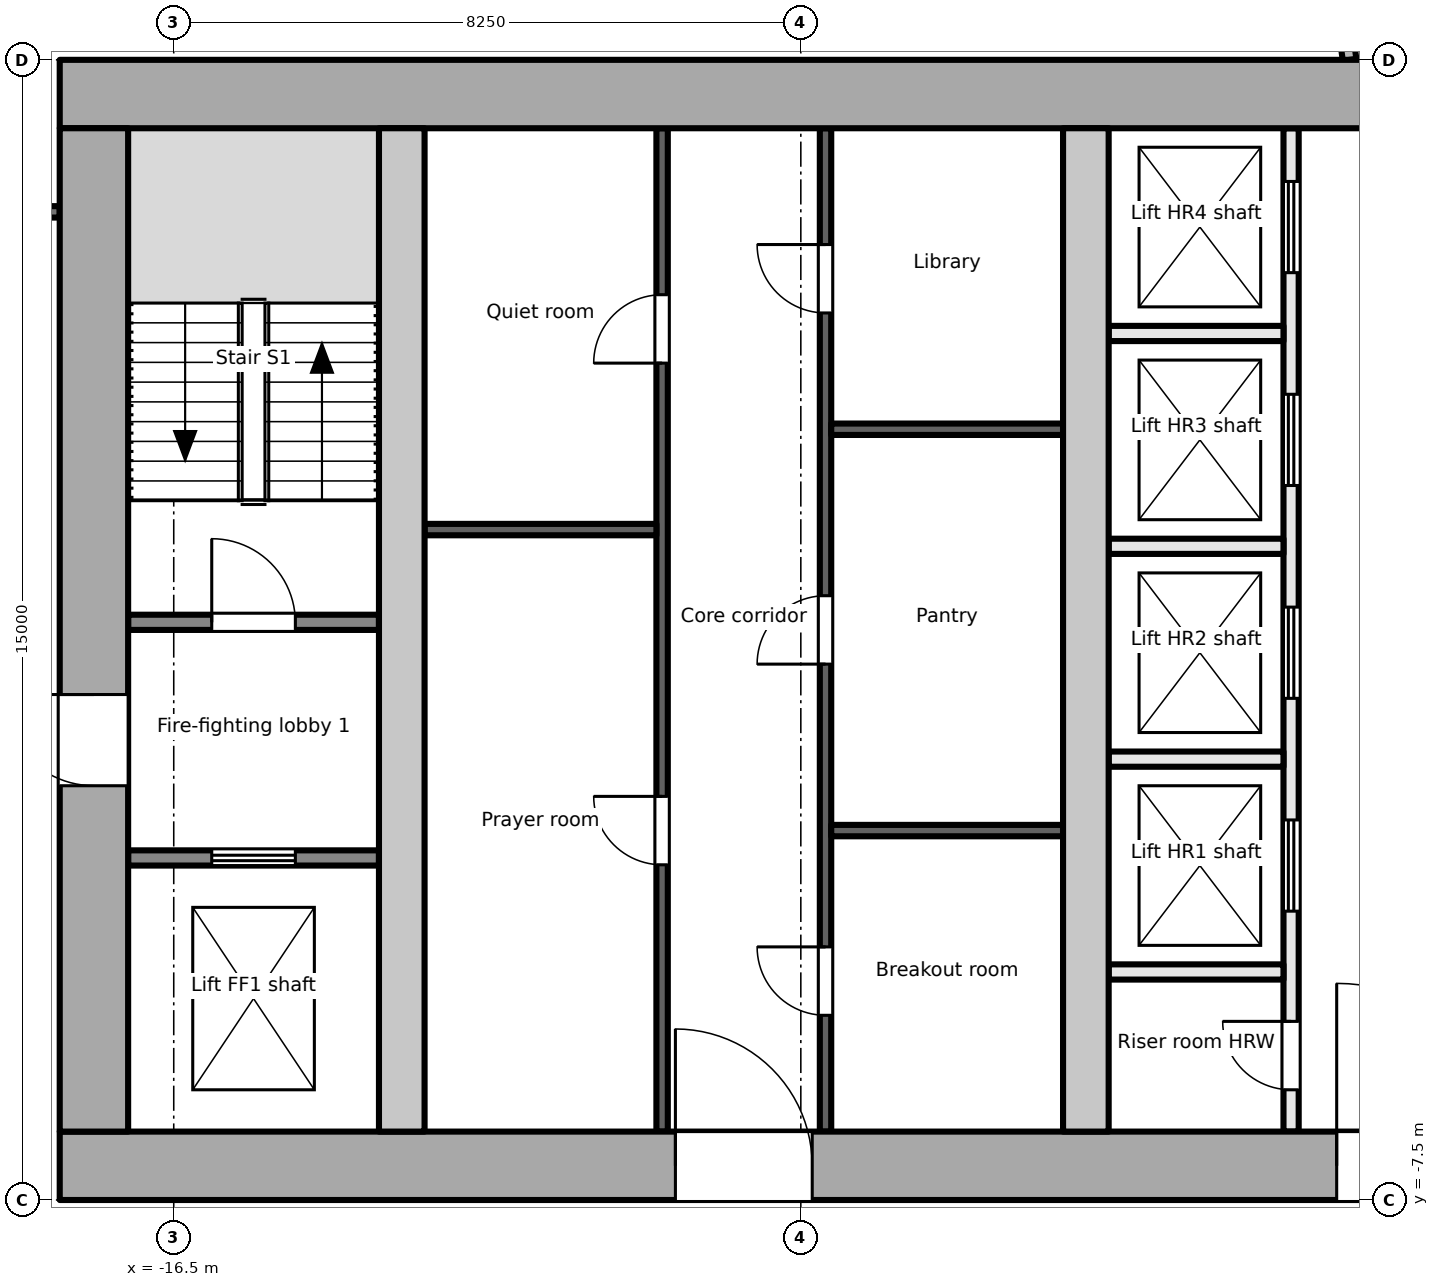
"""IFC4 building model, lengths in metres.
Left out: names, types, materials, properties, quantities, classifications, styles, units other than length and angle.
Written with IfcOpenShell. Run it as: python <this file> out.ifc"""

import sys

from ifc_helpers import new_model, si_unit, direction, frame, frame_2d, origin, place, context, subcontext, project, spatial, rectangle, extrude, element, fill, save


model = new_model("IFC4")
c1 = context("Model", 3, precision=1e-05, world=origin(), true_north=direction((0.0, 1.0)))
c2 = subcontext(c1, "Body", "Model", "MODEL_VIEW")
j1 = project(units=[si_unit("LENGTHUNIT", "METRE"), si_unit("PLANEANGLEUNIT", "RADIAN")], contexts=[c1])
p1 = place(None, origin())
s1 = spatial("IfcSite", under=j1, at=p1, CompositionType="ELEMENT")
p2 = place(p1, origin())
s2 = spatial("IfcBuilding", under=s1, at=p2, CompositionType="ELEMENT")
p3 = place(p2, frame((0.0, 0.0, 278.5)))
s3 = spatial("IfcBuildingStorey", under=s2, at=p3, CompositionType="ELEMENT", Elevation=278.5)
p4 = place(p3, frame((-18.0, -7.05, -0.2), z_axis=(0.0, 0.0, 1.0), x_axis=(1.0, 0.0, 0.0)))
e1 = element("IfcWall", 1, at=p4, inside=s3, PredefinedType="SHEAR", context=c2, shape_type="SweptSolid", body=[
    extrude(rectangle(XDim=36.0, YDim=0.9, at=frame_2d((18.0, 0.0))), origin(), (0.0, 0.0, 1.0), 3.9),
])
p5 = place(p4, frame((8.1, 0.0, 0.2)))
e2 = element("IfcOpeningElement", 2, at=p5, cuts=e1, PredefinedType="OPENING", context=c2, shape_type="SweptSolid", body=[
    extrude(rectangle(XDim=1.8, YDim=2.1, at=frame_2d((0.9, 1.05))), frame((0.0, 0.46, 0.0), z_axis=(0.0, -1.0, 0.0), x_axis=(1.0, 0.0, 0.0)), (0.0, 0.0, 1.0), 0.921),
])
p6 = place(p4, frame((16.8, 0.0, 0.2)))
e3 = element("IfcOpeningElement", 3, at=p6, cuts=e1, PredefinedType="OPENING", context=c2, shape_type="SweptSolid", body=[
    extrude(rectangle(XDim=2.4, YDim=2.1, at=frame_2d((1.2, 1.05))), frame((0.0, 0.46, 0.0), z_axis=(0.0, -1.0, 0.0), x_axis=(1.0, 0.0, 0.0)), (0.0, 0.0, 1.0), 0.921),
])
p7 = place(p4, frame((26.1, 0.0, 0.2)))
e4 = element("IfcOpeningElement", 4, at=p7, cuts=e1, PredefinedType="OPENING", context=c2, shape_type="SweptSolid", body=[
    extrude(rectangle(XDim=2.4, YDim=2.1, at=frame_2d((1.2, 1.05))), frame((0.0, 0.46, 0.0), z_axis=(0.0, -1.0, 0.0), x_axis=(1.0, 0.0, 0.0)), (0.0, 0.0, 1.0), 0.921),
])
p8 = place(p3, frame((-18.0, 7.05, -0.2), z_axis=(0.0, 0.0, 1.0), x_axis=(1.0, 0.0, 0.0)))
e5 = element("IfcWall", 5, at=p8, inside=s3, PredefinedType="SHEAR", context=c2, shape_type="SweptSolid", body=[
    extrude(rectangle(XDim=36.0, YDim=0.9, at=frame_2d((18.0, 0.0))), origin(), (0.0, 0.0, 1.0), 3.9),
])
p9 = place(p3, frame((-17.55, -6.6, -0.2), z_axis=(0.0, 0.0, 1.0), x_axis=(0.0, 1.0, 0.0)))
e6 = element("IfcWall", 6, at=p9, inside=s3, PredefinedType="SHEAR", context=c2, shape_type="SweptSolid", body=[
    extrude(rectangle(XDim=13.2, YDim=0.9, at=frame_2d((6.6, 0.0))), origin(), (0.0, 0.0, 1.0), 3.9),
])
p10 = place(p9, frame((4.55, 0.0, 0.2)))
e7 = element("IfcOpeningElement", 7, at=p10, cuts=e6, PredefinedType="OPENING", context=c2, shape_type="SweptSolid", body=[
    extrude(rectangle(XDim=1.2, YDim=2.1, at=frame_2d((0.6, 1.05))), frame((0.0, 0.46, 0.0), z_axis=(0.0, -1.0, 0.0), x_axis=(1.0, 0.0, 0.0)), (0.0, 0.0, 1.0), 0.921),
])
for number, where, z_axis, x_axis in (
    (8, (-13.5, -6.6, -0.2), (0.0, 0.0, 1.0), (0.0, 1.0, 0.0)),
    (9, (-4.5, -6.6, -0.2), (0.0, 0.0, 1.0), (0.0, 1.0, 0.0)),
):
    element("IfcWall", number, at=place(p3, frame(where, z_axis=z_axis, x_axis=x_axis)), inside=s3, PredefinedType="SHEAR", context=c2, shape_type="SweptSolid", body=[
        extrude(rectangle(XDim=13.2, YDim=0.6, at=frame_2d((6.6, 0.0))), origin(), (0.0, 0.0, 1.0), 3.9),
    ])
p11 = place(p3, frame((-17.1, -3.0, 0.0), z_axis=(0.0, 0.0, 1.0), x_axis=(1.0, 0.0, 0.0)))
e10 = element("IfcWall", 10, at=p11, inside=s3, PredefinedType="PARTITIONING", context=c2, shape_type="SweptSolid", body=[
    extrude(rectangle(XDim=3.3, YDim=0.2, at=frame_2d((1.65, 0.0))), origin(), (0.0, 0.0, 1.0), 3.7),
])
p12 = place(p11, frame((1.1, 0.0, 0.0)))
e11 = element("IfcOpeningElement", 11, at=p12, cuts=e10, PredefinedType="OPENING", context=c2, shape_type="SweptSolid", body=[
    extrude(rectangle(XDim=1.1, YDim=2.1, at=frame_2d((0.55, 1.05))), frame((0.0, 0.111, 0.0), z_axis=(0.0, -1.0, 0.0), x_axis=(1.0, 0.0, 0.0)), (0.0, 0.0, 1.0), 0.221),
])
p13 = place(p3, frame((-17.1, 0.1, 0.0), z_axis=(0.0, 0.0, 1.0), x_axis=(1.0, 0.0, 0.0)))
e12 = element("IfcWall", 12, at=p13, inside=s3, PredefinedType="PARTITIONING", context=c2, shape_type="SweptSolid", body=[
    extrude(rectangle(XDim=3.3, YDim=0.2, at=frame_2d((1.65, 0.0))), origin(), (0.0, 0.0, 1.0), 3.7),
])
p14 = place(p13, frame((1.1, 0.0, 0.0)))
e13 = element("IfcOpeningElement", 13, at=p14, cuts=e12, PredefinedType="OPENING", context=c2, shape_type="SweptSolid", body=[
    extrude(rectangle(XDim=1.1, YDim=2.1, at=frame_2d((0.55, 1.05))), frame((0.0, 0.111, 0.0), z_axis=(0.0, -1.0, 0.0), x_axis=(1.0, 0.0, 0.0)), (0.0, 0.0, 1.0), 0.221),
])
p15 = place(p3, frame((-10.075, -6.6, 0.0), z_axis=(0.0, 0.0, 1.0), x_axis=(0.0, 1.0, 0.0)))
e14 = element("IfcWall", 14, at=p15, inside=s3, PredefinedType="PARTITIONING", context=c2, shape_type="SweptSolid", body=[
    extrude(rectangle(XDim=13.2, YDim=0.15, at=frame_2d((6.6, 0.0))), origin(), (0.0, 0.0, 1.0), 3.7),
])
p16 = place(p15, frame((3.51, 0.0, 0.0)))
e15 = element("IfcOpeningElement", 15, at=p16, cuts=e14, PredefinedType="OPENING", context=c2, shape_type="SweptSolid", body=[
    extrude(rectangle(XDim=0.9, YDim=2.1, at=frame_2d((0.45, 1.05))), frame((0.0, 0.085, 0.0), z_axis=(0.0, -1.0, 0.0), x_axis=(1.0, 0.0, 0.0)), (0.0, 0.0, 1.0), 0.171),
])
p17 = place(p15, frame((10.11, 0.0, 0.0)))
e16 = element("IfcOpeningElement", 16, at=p17, cuts=e14, PredefinedType="OPENING", context=c2, shape_type="SweptSolid", body=[
    extrude(rectangle(XDim=0.9, YDim=2.1, at=frame_2d((0.45, 1.05))), frame((0.0, 0.085, 0.0), z_axis=(0.0, -1.0, 0.0), x_axis=(1.0, 0.0, 0.0)), (0.0, 0.0, 1.0), 0.171),
])
p18 = place(p3, frame((-13.2, 1.32, 0.0), z_axis=(0.0, 0.0, 1.0), x_axis=(1.0, 0.0, 0.0)))
e17 = element("IfcWall", 17, at=p18, inside=s3, PredefinedType="PARTITIONING", context=c2, shape_type="SweptSolid", body=[
    extrude(rectangle(XDim=3.05, YDim=0.15, at=frame_2d((1.525, 0.0))), origin(), (0.0, 0.0, 1.0), 3.7),
])
p19 = place(p3, frame((-7.925, -6.6, 0.0), z_axis=(0.0, 0.0, 1.0), x_axis=(0.0, 1.0, 0.0)))
e18 = element("IfcWall", 18, at=p19, inside=s3, PredefinedType="PARTITIONING", context=c2, shape_type="SweptSolid", body=[
    extrude(rectangle(XDim=13.2, YDim=0.15, at=frame_2d((6.6, 0.0))), origin(), (0.0, 0.0, 1.0), 3.7),
])
p20 = place(p19, frame((1.53, 0.0, 0.0)))
e19 = element("IfcOpeningElement", 19, at=p20, cuts=e18, PredefinedType="OPENING", context=c2, shape_type="SweptSolid", body=[
    extrude(rectangle(XDim=0.9, YDim=2.1, at=frame_2d((0.45, 1.05))), frame((0.0, 0.085, 0.0), z_axis=(0.0, -1.0, 0.0), x_axis=(1.0, 0.0, 0.0)), (0.0, 0.0, 1.0), 0.171),
])
p21 = place(p19, frame((6.15, 0.0, 0.0)))
e20 = element("IfcOpeningElement", 20, at=p21, cuts=e18, PredefinedType="OPENING", context=c2, shape_type="SweptSolid", body=[
    extrude(rectangle(XDim=0.9, YDim=2.1, at=frame_2d((0.45, 1.05))), frame((0.0, 0.085, 0.0), z_axis=(0.0, -1.0, 0.0), x_axis=(1.0, 0.0, 0.0)), (0.0, 0.0, 1.0), 0.171),
])
p22 = place(p19, frame((10.77, 0.0, 0.0)))
e21 = element("IfcOpeningElement", 21, at=p22, cuts=e18, PredefinedType="OPENING", context=c2, shape_type="SweptSolid", body=[
    extrude(rectangle(XDim=0.9, YDim=2.1, at=frame_2d((0.45, 1.05))), frame((0.0, 0.085, 0.0), z_axis=(0.0, -1.0, 0.0), x_axis=(1.0, 0.0, 0.0)), (0.0, 0.0, 1.0), 0.171),
])
for number, where, z_axis, x_axis in (
    (22, (-7.85, -2.64, 0.0), (0.0, 0.0, 1.0), (1.0, 0.0, 0.0)),
    (23, (-7.85, 2.64, 0.0), (0.0, 0.0, 1.0), (1.0, 0.0, 0.0)),
):
    element("IfcWall", number, at=place(p3, frame(where, z_axis=z_axis, x_axis=x_axis)), inside=s3, PredefinedType="PARTITIONING", context=c2, shape_type="SweptSolid", body=[
        extrude(rectangle(XDim=3.05, YDim=0.15, at=frame_2d((1.525, 0.0))), origin(), (0.0, 0.0, 1.0), 3.7),
    ])
p23 = place(p3, frame((-1.8, -6.6, 0.0), z_axis=(0.0, 0.0, 1.0), x_axis=(0.0, 1.0, 0.0)))
e24 = element("IfcWall", 24, at=p23, inside=s3, PredefinedType="PARTITIONING", context=c2, shape_type="SweptSolid", body=[
    extrude(rectangle(XDim=13.2, YDim=0.2, at=frame_2d((6.6, 0.0))), origin(), (0.0, 0.0, 1.0), 3.7),
])
p24 = place(p23, frame((0.55, 0.0, 0.0)))
e25 = element("IfcOpeningElement", 25, at=p24, cuts=e24, PredefinedType="OPENING", context=c2, shape_type="SweptSolid", body=[
    extrude(rectangle(XDim=0.9, YDim=2.1, at=frame_2d((0.45, 1.05))), frame((0.0, 0.111, 0.0), z_axis=(0.0, -1.0, 0.0), x_axis=(1.0, 0.0, 0.0)), (0.0, 0.0, 1.0), 0.221),
])
p25 = place(p23, frame((2.9, 0.0, 0.0)))
e26 = element("IfcOpeningElement", 26, at=p25, cuts=e24, PredefinedType="OPENING", context=c2, shape_type="SweptSolid", body=[
    extrude(rectangle(XDim=1.2, YDim=2.1, at=frame_2d((0.6, 1.05))), frame((0.0, 0.111, 0.0), z_axis=(0.0, -1.0, 0.0), x_axis=(1.0, 0.0, 0.0)), (0.0, 0.0, 1.0), 0.221),
])
p26 = place(p23, frame((5.7, 0.0, 0.0)))
e27 = element("IfcOpeningElement", 27, at=p26, cuts=e24, PredefinedType="OPENING", context=c2, shape_type="SweptSolid", body=[
    extrude(rectangle(XDim=1.2, YDim=2.1, at=frame_2d((0.6, 1.05))), frame((0.0, 0.111, 0.0), z_axis=(0.0, -1.0, 0.0), x_axis=(1.0, 0.0, 0.0)), (0.0, 0.0, 1.0), 0.221),
])
p27 = place(p23, frame((8.5, 0.0, 0.0)))
e28 = element("IfcOpeningElement", 28, at=p27, cuts=e24, PredefinedType="OPENING", context=c2, shape_type="SweptSolid", body=[
    extrude(rectangle(XDim=1.2, YDim=2.1, at=frame_2d((0.6, 1.05))), frame((0.0, 0.111, 0.0), z_axis=(0.0, -1.0, 0.0), x_axis=(1.0, 0.0, 0.0)), (0.0, 0.0, 1.0), 0.221),
])
p28 = place(p23, frame((11.3, 0.0, 0.0)))
e29 = element("IfcOpeningElement", 29, at=p28, cuts=e24, PredefinedType="OPENING", context=c2, shape_type="SweptSolid", body=[
    extrude(rectangle(XDim=1.2, YDim=2.1, at=frame_2d((0.6, 1.05))), frame((0.0, 0.111, 0.0), z_axis=(0.0, -1.0, 0.0), x_axis=(1.0, 0.0, 0.0)), (0.0, 0.0, 1.0), 0.221),
])
for number, where, z_axis, x_axis in (
    (30, (-4.2, -1.7, 0.0), (0.0, 0.0, 1.0), (1.0, 0.0, 0.0)),
    (31, (-4.2, 1.1, 0.0), (0.0, 0.0, 1.0), (1.0, 0.0, 0.0)),
    (32, (-4.2, 3.9, 0.0), (0.0, 0.0, 1.0), (1.0, 0.0, 0.0)),
    (33, (-4.2, -4.5, 0.0), (0.0, 0.0, 1.0), (1.0, 0.0, 0.0)),
):
    element("IfcWall", number, at=place(p3, frame(where, z_axis=z_axis, x_axis=x_axis)), inside=s3, PredefinedType="PARTITIONING", context=c2, shape_type="SweptSolid", body=[
        extrude(rectangle(XDim=2.3, YDim=0.2, at=frame_2d((1.15, 0.0))), origin(), (0.0, 0.0, 1.0), 3.7),
    ])
p29 = place(p3, frame((-20.925, 5.5, 0.0), z_axis=(0.0, 0.0, 1.0), x_axis=(1.0, 0.0, 0.0)))
e34 = element("IfcWall", 34, at=p29, inside=s3, PredefinedType="PARTITIONING", context=c2, shape_type="SweptSolid", body=[
    extrude(rectangle(XDim=2.925, YDim=0.15, at=frame_2d((1.462, 0.0))), origin(), (0.0, 0.0, 1.0), 3.7),
])
p30 = place(p3, frame((-1.312, 9.506, 0.0), z_axis=(0.0, 0.0, 1.0), x_axis=(0.139193896019, -0.990265145964, 0.0)))
e35 = element("IfcWall", 35, at=p30, inside=s3, PredefinedType="PARTITIONING", context=c2, shape_type="SweptSolid", body=[
    extrude(rectangle(XDim=2.026, YDim=0.18, at=frame_2d((1.013, 0.0))), origin(), (0.0, 0.0, 1.0), 3.7),
])
p31 = place(p12, origin())
e36 = element("IfcDoor", 36, at=p31, inside=s3, OperationType="DOUBLE_DOOR_SLIDING", PredefinedType="DOOR", context=c2, shape_type="SweptSolid", body=[
    extrude(rectangle(XDim=1.1, YDim=2.1, at=frame_2d((0.55, 1.05))), frame((0.0, 0.025, 0.0), z_axis=(0.0, -1.0, 0.0), x_axis=(1.0, 0.0, 0.0)), (0.0, 0.0, 1.0), 0.05),
])
fill(e11, e36)
p32 = place(p10, origin())
e37 = element("IfcDoor", 37, at=p32, inside=s3, OperationType="SINGLE_SWING_RIGHT", PredefinedType="DOOR", context=c2, shape_type="SweptSolid", body=[
    extrude(rectangle(XDim=1.2, YDim=2.1, at=frame_2d((0.6, 1.05))), frame((0.0, 0.025, 0.0), z_axis=(0.0, -1.0, 0.0), x_axis=(1.0, 0.0, 0.0)), (0.0, 0.0, 1.0), 0.05),
])
fill(e7, e37)
p33 = place(p14, origin())
e38 = element("IfcDoor", 38, at=p33, inside=s3, OperationType="SINGLE_SWING_LEFT", PredefinedType="DOOR", context=c2, shape_type="SweptSolid", body=[
    extrude(rectangle(XDim=1.1, YDim=2.1, at=frame_2d((0.55, 1.05))), frame((0.0, 0.025, 0.0), z_axis=(0.0, -1.0, 0.0), x_axis=(1.0, 0.0, 0.0)), (0.0, 0.0, 1.0), 0.05),
])
fill(e13, e38)
p34 = place(p16, origin())
e39 = element("IfcDoor", 39, at=p34, inside=s3, OperationType="SINGLE_SWING_RIGHT", PredefinedType="DOOR", context=c2, shape_type="SweptSolid", body=[
    extrude(rectangle(XDim=0.9, YDim=2.1, at=frame_2d((0.45, 1.05))), frame((0.0, 0.025, 0.0), z_axis=(0.0, -1.0, 0.0), x_axis=(1.0, 0.0, 0.0)), (0.0, 0.0, 1.0), 0.05),
])
fill(e15, e39)
p35 = place(p17, origin())
e40 = element("IfcDoor", 40, at=p35, inside=s3, OperationType="SINGLE_SWING_LEFT", PredefinedType="DOOR", context=c2, shape_type="SweptSolid", body=[
    extrude(rectangle(XDim=0.9, YDim=2.1, at=frame_2d((0.45, 1.05))), frame((0.0, 0.025, 0.0), z_axis=(0.0, -1.0, 0.0), x_axis=(1.0, 0.0, 0.0)), (0.0, 0.0, 1.0), 0.05),
])
fill(e16, e40)
p36 = place(p20, origin())
e41 = element("IfcDoor", 41, at=p36, inside=s3, OperationType="SINGLE_SWING_RIGHT", PredefinedType="DOOR", context=c2, shape_type="SweptSolid", body=[
    extrude(rectangle(XDim=0.9, YDim=2.1, at=frame_2d((0.45, 1.05))), frame((0.0, 0.025, 0.0), z_axis=(0.0, -1.0, 0.0), x_axis=(1.0, 0.0, 0.0)), (0.0, 0.0, 1.0), 0.05),
])
fill(e19, e41)
p37 = place(p21, origin())
e42 = element("IfcDoor", 42, at=p37, inside=s3, OperationType="SINGLE_SWING_LEFT", PredefinedType="DOOR", context=c2, shape_type="SweptSolid", body=[
    extrude(rectangle(XDim=0.9, YDim=2.1, at=frame_2d((0.45, 1.05))), frame((0.0, 0.025, 0.0), z_axis=(0.0, -1.0, 0.0), x_axis=(1.0, 0.0, 0.0)), (0.0, 0.0, 1.0), 0.05),
])
fill(e20, e42)
p38 = place(p22, origin())
e43 = element("IfcDoor", 43, at=p38, inside=s3, OperationType="SINGLE_SWING_RIGHT", PredefinedType="DOOR", context=c2, shape_type="SweptSolid", body=[
    extrude(rectangle(XDim=0.9, YDim=2.1, at=frame_2d((0.45, 1.05))), frame((0.0, 0.025, 0.0), z_axis=(0.0, -1.0, 0.0), x_axis=(1.0, 0.0, 0.0)), (0.0, 0.0, 1.0), 0.05),
])
fill(e21, e43)
p39 = place(p5, origin())
e44 = element("IfcDoor", 44, at=p39, inside=s3, OperationType="SINGLE_SWING_LEFT", PredefinedType="DOOR", context=c2, shape_type="SweptSolid", body=[
    extrude(rectangle(XDim=1.8, YDim=2.1, at=frame_2d((0.9, 1.05))), frame((0.0, 0.025, 0.0), z_axis=(0.0, -1.0, 0.0), x_axis=(1.0, 0.0, 0.0)), (0.0, 0.0, 1.0), 0.05),
])
fill(e2, e44)
p40 = place(p24, origin())
e45 = element("IfcDoor", 45, at=p40, inside=s3, OperationType="SINGLE_SWING_RIGHT", PredefinedType="DOOR", context=c2, shape_type="SweptSolid", body=[
    extrude(rectangle(XDim=0.9, YDim=2.1, at=frame_2d((0.45, 1.05))), frame((0.0, 0.025, 0.0), z_axis=(0.0, -1.0, 0.0), x_axis=(1.0, 0.0, 0.0)), (0.0, 0.0, 1.0), 0.05),
])
fill(e25, e45)
p41 = place(p25, origin())
e46 = element("IfcDoor", 46, at=p41, inside=s3, OperationType="DOUBLE_DOOR_SLIDING", PredefinedType="DOOR", context=c2, shape_type="SweptSolid", body=[
    extrude(rectangle(XDim=1.2, YDim=2.1, at=frame_2d((0.6, 1.05))), frame((0.0, 0.025, 0.0), z_axis=(0.0, -1.0, 0.0), x_axis=(1.0, 0.0, 0.0)), (0.0, 0.0, 1.0), 0.05),
])
fill(e26, e46)
p42 = place(p26, origin())
e47 = element("IfcDoor", 47, at=p42, inside=s3, OperationType="DOUBLE_DOOR_SLIDING", PredefinedType="DOOR", context=c2, shape_type="SweptSolid", body=[
    extrude(rectangle(XDim=1.2, YDim=2.1, at=frame_2d((0.6, 1.05))), frame((0.0, 0.025, 0.0), z_axis=(0.0, -1.0, 0.0), x_axis=(1.0, 0.0, 0.0)), (0.0, 0.0, 1.0), 0.05),
])
fill(e27, e47)
p43 = place(p27, origin())
e48 = element("IfcDoor", 48, at=p43, inside=s3, OperationType="DOUBLE_DOOR_SLIDING", PredefinedType="DOOR", context=c2, shape_type="SweptSolid", body=[
    extrude(rectangle(XDim=1.2, YDim=2.1, at=frame_2d((0.6, 1.05))), frame((0.0, 0.025, 0.0), z_axis=(0.0, -1.0, 0.0), x_axis=(1.0, 0.0, 0.0)), (0.0, 0.0, 1.0), 0.05),
])
fill(e28, e48)
p44 = place(p28, origin())
e49 = element("IfcDoor", 49, at=p44, inside=s3, OperationType="DOUBLE_DOOR_SLIDING", PredefinedType="DOOR", context=c2, shape_type="SweptSolid", body=[
    extrude(rectangle(XDim=1.2, YDim=2.1, at=frame_2d((0.6, 1.05))), frame((0.0, 0.025, 0.0), z_axis=(0.0, -1.0, 0.0), x_axis=(1.0, 0.0, 0.0)), (0.0, 0.0, 1.0), 0.05),
])
fill(e29, e49)
p45 = place(p6, origin())
e50 = element("IfcDoor", 50, at=p45, inside=s3, OperationType="DOUBLE_DOOR_DOUBLE_SWING", PredefinedType="DOOR", context=c2, shape_type="SweptSolid", body=[
    extrude(rectangle(XDim=2.4, YDim=2.1, at=frame_2d((1.2, 1.05))), frame((0.0, 0.025, 0.0), z_axis=(0.0, -1.0, 0.0), x_axis=(1.0, 0.0, 0.0)), (0.0, 0.0, 1.0), 0.05),
])
fill(e3, e50)
save(model, sys.argv[1])
